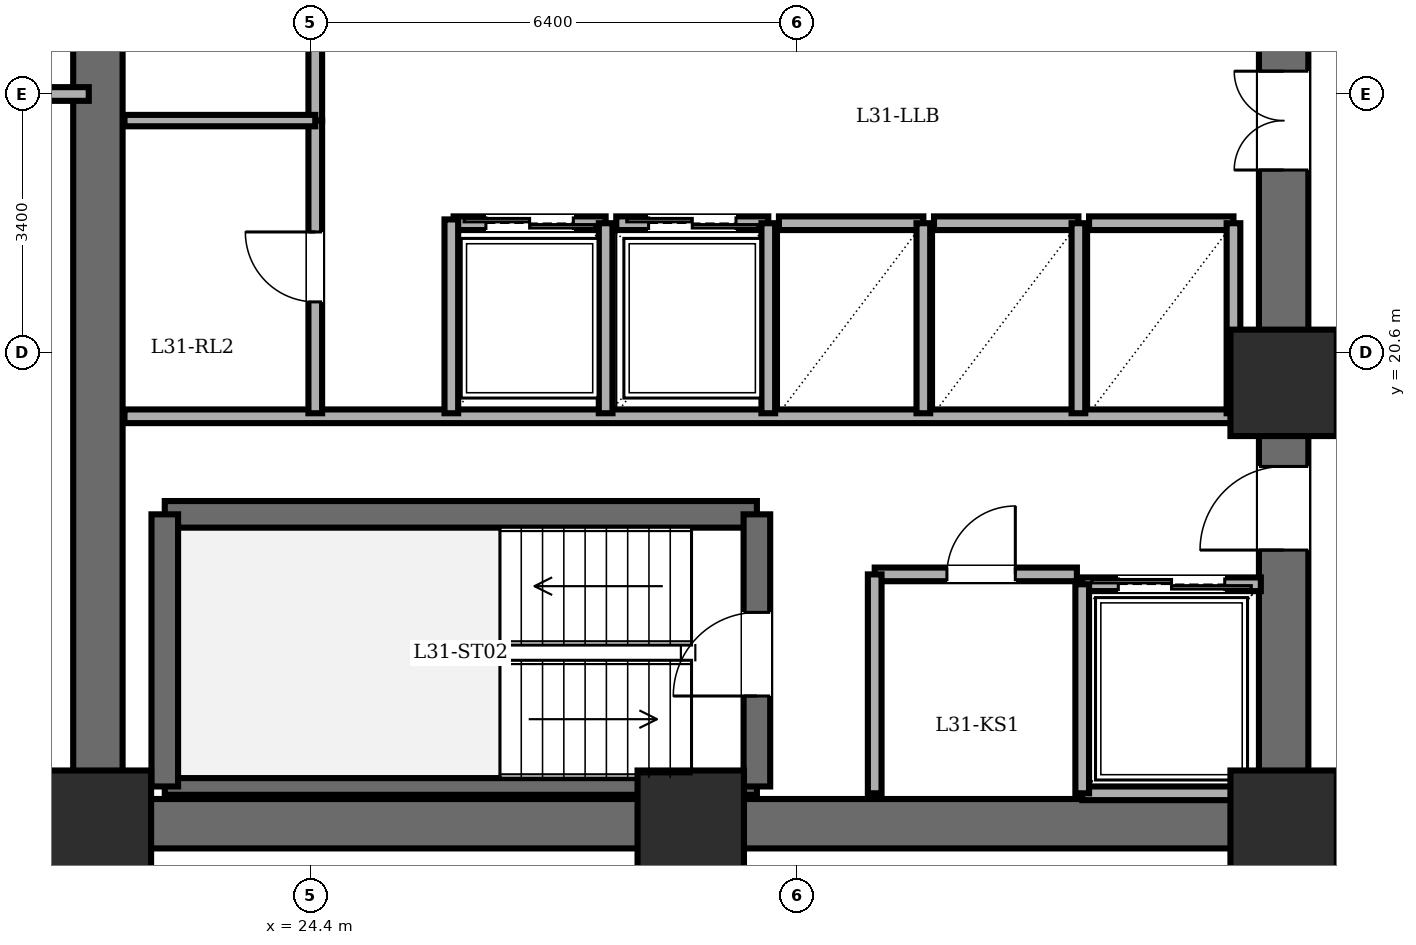
"""IFC4 building model, lengths in metres.
Left out: names, types, materials, properties, quantities, classifications, styles, units other than length and angle.
Written with IfcOpenShell. Run it as: python <this file> out.ifc"""

import sys

from ifc_helpers import new_model, si_unit, direction, frame, frame_2d, origin, origin_2d, place, context, subcontext, project, spatial, rectangle, extrude, element, fill, save


model = new_model("IFC4")
c1 = context("Model", 3, precision=1e-05, world=origin(), true_north=direction((0.0, 1.0)))
c2 = subcontext(c1, "Body", "Model", "MODEL_VIEW")
j1 = project(units=[si_unit("LENGTHUNIT", "METRE"), si_unit("PLANEANGLEUNIT", "RADIAN")], contexts=[c1])
p1 = place(None, origin())
s1 = spatial("IfcSite", under=j1, at=p1, CompositionType="ELEMENT")
p2 = place(p1, origin())
s2 = spatial("IfcBuilding", under=s1, at=p2, CompositionType="ELEMENT")
p3 = place(p2, frame((0.0, 0.0, 118.7)))
s3 = spatial("IfcBuildingStorey", under=s2, at=p3, CompositionType="ELEMENT", Elevation=118.7)
for number, where, z_axis, x_axis in (
    (1, (21.6, 14.4, 0.0), (0.0, 0.0, 1.0), (1.0, 0.0, 0.0)),
    (2, (29.4, 14.4, 0.0), (0.0, 0.0, 1.0), (1.0, 0.0, 0.0)),
    (3, (37.2, 14.4, 0.0), (0.0, 0.0, 1.0), (1.0, 0.0, 0.0)),
    (4, (37.2, 20.2, 0.0), (0.0, 0.0, 1.0), (1.0, 0.0, 0.0)),
):
    element("IfcColumn", number, at=place(p3, frame(where, z_axis=z_axis, x_axis=x_axis)), inside=s3, PredefinedType="COLUMN", context=c2, shape_type="SweptSolid", body=[
        extrude(rectangle(XDim=1.4, YDim=1.4, at=origin_2d()), origin(), (0.0, 0.0, 1.0), 3.6),
    ])
p4 = place(p3, frame((21.6, 14.4, 0.0), z_axis=(0.0, 0.0, 1.0), x_axis=(0.0, 1.0, 0.0)))
e5 = element("IfcWall", 5, at=p4, inside=s3, PredefinedType="SHEAR", context=c2, shape_type="SweptSolid", body=[
    extrude(rectangle(XDim=19.2, YDim=0.65, at=frame_2d((9.6, 0.0))), origin(), (0.0, 0.0, 1.0), 3.4),
])
p5 = place(p3, frame((37.2, 14.4, 0.0), z_axis=(0.0, 0.0, 1.0), x_axis=(-1.0, 0.0, 0.0)))
e6 = element("IfcWall", 6, at=p5, inside=s3, PredefinedType="SHEAR", context=c2, shape_type="SweptSolid", body=[
    extrude(rectangle(XDim=15.6, YDim=0.65, at=frame_2d((7.8, 0.0))), origin(), (0.0, 0.0, 1.0), 3.4),
])
p6 = place(p3, frame((37.2, 14.4, 0.0), z_axis=(0.0, 0.0, 1.0), x_axis=(0.0, 1.0, 0.0)))
e7 = element("IfcWall", 7, at=p6, inside=s3, PredefinedType="SHEAR", context=c2, shape_type="SweptSolid", body=[
    extrude(rectangle(XDim=19.2, YDim=0.65, at=frame_2d((9.6, 0.0))), origin(), (0.0, 0.0, 1.0), 3.4),
])
p7 = place(p6, frame((15.8, 0.0, 0.0)))
e8 = element("IfcOpeningElement", 8, at=p7, cuts=e7, PredefinedType="OPENING", context=c2, shape_type="SweptSolid", body=[
    extrude(rectangle(XDim=1.15, YDim=2.15, at=frame_2d((0.575, 1.075))), frame((0.0, 0.335, 0.0), z_axis=(0.0, -1.0, 0.0), x_axis=(1.0, 0.0, 0.0)), (0.0, 0.0, 1.0), 0.67),
])
p8 = place(p6, frame((3.6, 0.0, 0.0)))
e9 = element("IfcOpeningElement", 9, at=p8, cuts=e7, PredefinedType="OPENING", context=c2, shape_type="SweptSolid", body=[
    extrude(rectangle(XDim=1.1, YDim=2.15, at=frame_2d((0.55, 1.075))), frame((0.0, 0.335, 0.0), z_axis=(0.0, -1.0, 0.0), x_axis=(1.0, 0.0, 0.0)), (0.0, 0.0, 1.0), 0.67),
])
p9 = place(p6, frame((8.6, 0.0, 0.0)))
e10 = element("IfcOpeningElement", 10, at=p9, cuts=e7, PredefinedType="OPENING", context=c2, shape_type="SweptSolid", body=[
    extrude(rectangle(XDim=1.3, YDim=2.2, at=frame_2d((0.65, 1.1))), frame((0.0, 0.335, 0.0), z_axis=(0.0, -1.0, 0.0), x_axis=(1.0, 0.0, 0.0)), (0.0, 0.0, 1.0), 0.67),
])
p10 = place(p3, frame((22.48, 18.47, 0.0), z_axis=(0.0, 0.0, 1.0), x_axis=(1.0, 0.0, 0.0)))
e11 = element("IfcWall", 11, at=p10, inside=s3, PredefinedType="SOLIDWALL", context=c2, shape_type="SweptSolid", body=[
    extrude(rectangle(XDim=7.79, YDim=0.35, at=frame_2d((3.895, 0.0))), origin(), (0.0, 0.0, 1.0), 3.4),
])
p11 = place(p3, frame((22.48, 14.89, 0.0), z_axis=(0.0, 0.0, 1.0), x_axis=(1.0, 0.0, 0.0)))
e12 = element("IfcWall", 12, at=p11, inside=s3, PredefinedType="PARTITIONING", context=c2, shape_type="SweptSolid", body=[
    extrude(rectangle(XDim=7.79, YDim=0.22, at=frame_2d((3.895, 0.0))), origin(), (0.0, 0.0, 1.0), 3.4),
])
p12 = place(p3, frame((22.48, 14.89, 0.0), z_axis=(0.0, 0.0, 1.0), x_axis=(0.0, 1.0, 0.0)))
e13 = element("IfcWall", 13, at=p12, inside=s3, PredefinedType="SOLIDWALL", context=c2, shape_type="SweptSolid", body=[
    extrude(rectangle(XDim=3.58, YDim=0.35, at=frame_2d((1.79, 0.0))), origin(), (0.0, 0.0, 1.0), 3.4),
])
p13 = place(p3, frame((30.27, 14.89, 0.0), z_axis=(0.0, 0.0, 1.0), x_axis=(0.0, 1.0, 0.0)))
e14 = element("IfcWall", 14, at=p13, inside=s3, PredefinedType="SOLIDWALL", context=c2, shape_type="SweptSolid", body=[
    extrude(rectangle(XDim=3.58, YDim=0.35, at=frame_2d((1.79, 0.0))), origin(), (0.0, 0.0, 1.0), 3.4),
])
p14 = place(p13, frame((1.19, 0.0, 0.0)))
e15 = element("IfcOpeningElement", 15, at=p14, cuts=e14, PredefinedType="OPENING", context=c2, shape_type="SweptSolid", body=[
    extrude(rectangle(XDim=1.1, YDim=2.15, at=frame_2d((0.55, 1.075))), frame((0.0, 0.185, 0.0), z_axis=(0.0, -1.0, 0.0), x_axis=(1.0, 0.0, 0.0)), (0.0, 0.0, 1.0), 0.37),
])
p15 = place(p3, frame((21.95, 19.76, 0.0), z_axis=(0.0, 0.0, 1.0), x_axis=(1.0, 0.0, 0.0)))
e16 = element("IfcWall", 16, at=p15, inside=s3, PredefinedType="PARTITIONING", context=c2, shape_type="SweptSolid", body=[
    extrude(rectangle(XDim=14.87, YDim=0.18, at=frame_2d((7.435, 0.0))), origin(), (0.0, 0.0, 1.0), 3.4),
])
p16 = place(p3, frame((31.82, 17.68, 0.0), z_axis=(0.0, 0.0, 1.0), x_axis=(1.0, 0.0, 0.0)))
e17 = element("IfcWall", 17, at=p16, inside=s3, PredefinedType="PARTITIONING", context=c2, shape_type="SweptSolid", body=[
    extrude(rectangle(XDim=2.66, YDim=0.18, at=frame_2d((1.33, 0.0))), origin(), (0.0, 0.0, 1.0), 3.4),
])
p17 = place(p16, frame((0.95, 0.0, 0.0)))
e18 = element("IfcOpeningElement", 18, at=p17, cuts=e17, PredefinedType="OPENING", context=c2, shape_type="SweptSolid", body=[
    extrude(rectangle(XDim=0.9, YDim=2.05, at=frame_2d((0.45, 1.025))), frame((0.0, 0.1, 0.0), z_axis=(0.0, -1.0, 0.0), x_axis=(1.0, 0.0, 0.0)), (0.0, 0.0, 1.0), 0.2),
])
p18 = place(p3, frame((31.82, 14.8, 0.0), z_axis=(0.0, 0.0, 1.0), x_axis=(0.0, 1.0, 0.0)))
e19 = element("IfcWall", 19, at=p18, inside=s3, PredefinedType="PARTITIONING", context=c2, shape_type="SweptSolid", body=[
    extrude(rectangle(XDim=2.88, YDim=0.18, at=frame_2d((1.44, 0.0))), origin(), (0.0, 0.0, 1.0), 3.4),
])
p19 = place(p3, frame((34.55, 17.55, 0.0), z_axis=(0.0, 0.0, 1.0), x_axis=(1.0, 0.0, 0.0)))
e20 = element("IfcWall", 20, at=p19, inside=s3, PredefinedType="PARTITIONING", context=c2, shape_type="SweptSolid", body=[
    extrude(rectangle(XDim=2.35, YDim=0.18, at=frame_2d((1.175, 0.0))), origin(), (0.0, 0.0, 1.0), 3.4),
])
p20 = place(p19, frame((0.475, 0.0, 0.0)))
e21 = element("IfcOpeningElement", 21, at=p20, cuts=e20, PredefinedType="OPENING", context=c2, shape_type="SweptSolid", body=[
    extrude(rectangle(XDim=1.4, YDim=2.3, at=frame_2d((0.7, 1.15))), frame((0.0, 0.1, 0.0), z_axis=(0.0, -1.0, 0.0), x_axis=(1.0, 0.0, 0.0)), (0.0, 0.0, 1.0), 0.2),
])
p21 = place(p3, frame((36.9, 14.8, 0.0), z_axis=(0.0, 0.0, 1.0), x_axis=(-1.0, 0.0, 0.0)))
e22 = element("IfcWall", 22, at=p21, inside=s3, PredefinedType="PARTITIONING", context=c2, shape_type="SweptSolid", body=[
    extrude(rectangle(XDim=2.35, YDim=0.18, at=frame_2d((1.175, 0.0))), origin(), (0.0, 0.0, 1.0), 3.4),
])
p22 = place(p3, frame((34.55, 17.55, 0.0), z_axis=(0.0, 0.0, 1.0), x_axis=(0.0, -1.0, 0.0)))
e23 = element("IfcWall", 23, at=p22, inside=s3, PredefinedType="PARTITIONING", context=c2, shape_type="SweptSolid", body=[
    extrude(rectangle(XDim=2.75, YDim=0.18, at=frame_2d((1.375, 0.0))), origin(), (0.0, 0.0, 1.0), 3.4),
])
p23 = place(p3, frame((26.28, 22.3, 0.0), z_axis=(0.0, 0.0, 1.0), x_axis=(1.0, 0.0, 0.0)))
e24 = element("IfcWall", 24, at=p23, inside=s3, PredefinedType="PARTITIONING", context=c2, shape_type="SweptSolid", body=[
    extrude(rectangle(XDim=2.0, YDim=0.18, at=frame_2d((1.0, 0.0))), origin(), (0.0, 0.0, 1.0), 3.4),
])
p24 = place(p23, frame((0.425, 0.0, 0.0)))
e25 = element("IfcOpeningElement", 25, at=p24, cuts=e24, PredefinedType="OPENING", context=c2, shape_type="SweptSolid", body=[
    extrude(rectangle(XDim=1.15, YDim=2.2, at=frame_2d((0.575, 1.1))), frame((0.0, 0.1, 0.0), z_axis=(0.0, -1.0, 0.0), x_axis=(1.0, 0.0, 0.0)), (0.0, 0.0, 1.0), 0.2),
])
p25 = place(p3, frame((28.28, 19.8, 0.0), z_axis=(0.0, 0.0, 1.0), x_axis=(0.0, 1.0, 0.0)))
e26 = element("IfcWall", 26, at=p25, inside=s3, PredefinedType="PARTITIONING", context=c2, shape_type="SweptSolid", body=[
    extrude(rectangle(XDim=2.5, YDim=0.18, at=frame_2d((1.25, 0.0))), origin(), (0.0, 0.0, 1.0), 3.4),
])
p26 = place(p3, frame((28.42, 22.3, 0.0), z_axis=(0.0, 0.0, 1.0), x_axis=(1.0, 0.0, 0.0)))
e27 = element("IfcWall", 27, at=p26, inside=s3, PredefinedType="PARTITIONING", context=c2, shape_type="SweptSolid", body=[
    extrude(rectangle(XDim=2.0, YDim=0.18, at=frame_2d((1.0, 0.0))), origin(), (0.0, 0.0, 1.0), 3.4),
])
p27 = place(p26, frame((0.425, 0.0, 0.0)))
e28 = element("IfcOpeningElement", 28, at=p27, cuts=e27, PredefinedType="OPENING", context=c2, shape_type="SweptSolid", body=[
    extrude(rectangle(XDim=1.15, YDim=2.2, at=frame_2d((0.575, 1.1))), frame((0.0, 0.1, 0.0), z_axis=(0.0, -1.0, 0.0), x_axis=(1.0, 0.0, 0.0)), (0.0, 0.0, 1.0), 0.2),
])
p28 = place(p3, frame((30.42, 19.8, 0.0), z_axis=(0.0, 0.0, 1.0), x_axis=(0.0, 1.0, 0.0)))
e29 = element("IfcWall", 29, at=p28, inside=s3, PredefinedType="PARTITIONING", context=c2, shape_type="SweptSolid", body=[
    extrude(rectangle(XDim=2.5, YDim=0.18, at=frame_2d((1.25, 0.0))), origin(), (0.0, 0.0, 1.0), 3.4),
])
p29 = place(p3, frame((30.56, 22.3, 0.0), z_axis=(0.0, 0.0, 1.0), x_axis=(1.0, 0.0, 0.0)))
e30 = element("IfcWall", 30, at=p29, inside=s3, PredefinedType="PARTITIONING", context=c2, shape_type="SweptSolid", body=[
    extrude(rectangle(XDim=1.9, YDim=0.18, at=frame_2d((0.95, 0.0))), origin(), (0.0, 0.0, 1.0), 3.4),
])
p30 = place(p3, frame((32.46, 19.8, 0.0), z_axis=(0.0, 0.0, 1.0), x_axis=(0.0, 1.0, 0.0)))
e31 = element("IfcWall", 31, at=p30, inside=s3, PredefinedType="PARTITIONING", context=c2, shape_type="SweptSolid", body=[
    extrude(rectangle(XDim=2.5, YDim=0.18, at=frame_2d((1.25, 0.0))), origin(), (0.0, 0.0, 1.0), 3.4),
])
p31 = place(p3, frame((32.6, 22.3, 0.0), z_axis=(0.0, 0.0, 1.0), x_axis=(1.0, 0.0, 0.0)))
e32 = element("IfcWall", 32, at=p31, inside=s3, PredefinedType="PARTITIONING", context=c2, shape_type="SweptSolid", body=[
    extrude(rectangle(XDim=1.9, YDim=0.18, at=frame_2d((0.95, 0.0))), origin(), (0.0, 0.0, 1.0), 3.4),
])
p32 = place(p3, frame((34.5, 19.8, 0.0), z_axis=(0.0, 0.0, 1.0), x_axis=(0.0, 1.0, 0.0)))
e33 = element("IfcWall", 33, at=p32, inside=s3, PredefinedType="PARTITIONING", context=c2, shape_type="SweptSolid", body=[
    extrude(rectangle(XDim=2.5, YDim=0.18, at=frame_2d((1.25, 0.0))), origin(), (0.0, 0.0, 1.0), 3.4),
])
p33 = place(p3, frame((34.64, 22.3, 0.0), z_axis=(0.0, 0.0, 1.0), x_axis=(1.0, 0.0, 0.0)))
e34 = element("IfcWall", 34, at=p33, inside=s3, PredefinedType="PARTITIONING", context=c2, shape_type="SweptSolid", body=[
    extrude(rectangle(XDim=1.9, YDim=0.18, at=frame_2d((0.95, 0.0))), origin(), (0.0, 0.0, 1.0), 3.4),
])
p34 = place(p3, frame((36.54, 19.8, 0.0), z_axis=(0.0, 0.0, 1.0), x_axis=(0.0, 1.0, 0.0)))
e35 = element("IfcWall", 35, at=p34, inside=s3, PredefinedType="PARTITIONING", context=c2, shape_type="SweptSolid", body=[
    extrude(rectangle(XDim=2.5, YDim=0.18, at=frame_2d((1.25, 0.0))), origin(), (0.0, 0.0, 1.0), 3.4),
])
p35 = place(p3, frame((24.46, 23.65, 0.0), z_axis=(0.0, 0.0, 1.0), x_axis=(0.0, 1.0, 0.0)))
e36 = element("IfcWall", 36, at=p35, inside=s3, PredefinedType="PARTITIONING", context=c2, shape_type="SweptSolid", body=[
    extrude(rectangle(XDim=3.85, YDim=0.18, at=frame_2d((1.925, 0.0))), origin(), (0.0, 0.0, 1.0), 3.4),
])
p36 = place(p35, frame((1.465, 0.0, 0.0)))
e37 = element("IfcOpeningElement", 37, at=p36, cuts=e36, PredefinedType="OPENING", context=c2, shape_type="SweptSolid", body=[
    extrude(rectangle(XDim=0.92, YDim=2.1, at=frame_2d((0.46, 1.05))), frame((0.0, 0.1, 0.0), z_axis=(0.0, -1.0, 0.0), x_axis=(1.0, 0.0, 0.0)), (0.0, 0.0, 1.0), 0.2),
])
p37 = place(p3, frame((24.46, 19.8, 0.0), z_axis=(0.0, 0.0, 1.0), x_axis=(0.0, 1.0, 0.0)))
e38 = element("IfcWall", 38, at=p37, inside=s3, PredefinedType="PARTITIONING", context=c2, shape_type="SweptSolid", body=[
    extrude(rectangle(XDim=3.85, YDim=0.18, at=frame_2d((1.925, 0.0))), origin(), (0.0, 0.0, 1.0), 3.4),
])
p38 = place(p37, frame((1.465, 0.0, 0.0)))
e39 = element("IfcOpeningElement", 39, at=p38, cuts=e38, PredefinedType="OPENING", context=c2, shape_type="SweptSolid", body=[
    extrude(rectangle(XDim=0.92, YDim=2.1, at=frame_2d((0.46, 1.05))), frame((0.0, 0.1, 0.0), z_axis=(0.0, -1.0, 0.0), x_axis=(1.0, 0.0, 0.0)), (0.0, 0.0, 1.0), 0.2),
])
p39 = place(p3, frame((21.95, 23.65, 0.0), z_axis=(0.0, 0.0, 1.0), x_axis=(1.0, 0.0, 0.0)))
e40 = element("IfcWall", 40, at=p39, inside=s3, PredefinedType="PARTITIONING", context=c2, shape_type="SweptSolid", body=[
    extrude(rectangle(XDim=2.51, YDim=0.15, at=frame_2d((1.255, 0.0))), origin(), (0.0, 0.0, 1.0), 3.4),
])
p40 = place(p3, frame((26.25, 19.8, 0.0), z_axis=(0.0, 0.0, 1.0), x_axis=(0.0, 1.0, 0.0)))
e41 = element("IfcWall", 41, at=p40, inside=s3, PredefinedType="PARTITIONING", context=c2, shape_type="SweptSolid", body=[
    extrude(rectangle(XDim=2.55, YDim=0.18, at=frame_2d((1.275, 0.0))), origin(), (0.0, 0.0, 1.0), 3.4),
])
p41 = place(p3, frame((8.8, 14.18, 0.0), z_axis=(0.0, 0.0, 1.0), x_axis=(1.0, 0.0, 0.0)))
e42 = element("IfcWall", 42, at=p41, inside=s3, PredefinedType="PARTITIONING", context=c2, shape_type="SweptSolid", body=[
    extrude(rectangle(XDim=12.68, YDim=0.18, at=frame_2d((6.34, 0.0))), origin(), (0.0, 0.0, 1.0), 3.4),
])
p42 = place(p41, frame((6.18, 0.0, 0.0)))
e43 = element("IfcOpeningElement", 43, at=p42, cuts=e42, PredefinedType="OPENING", context=c2, shape_type="SweptSolid", body=[
    extrude(rectangle(XDim=1.0, YDim=2.15, at=frame_2d((0.5, 1.075))), frame((0.0, 0.1, 0.0), z_axis=(0.0, -1.0, 0.0), x_axis=(1.0, 0.0, 0.0)), (0.0, 0.0, 1.0), 0.2),
])
p43 = place(p3, frame((8.8, 24.0, 0.0), z_axis=(0.0, 0.0, 1.0), x_axis=(1.0, 0.0, 0.0)))
e44 = element("IfcWall", 44, at=p43, inside=s3, PredefinedType="PARTITIONING", context=c2, shape_type="SweptSolid", body=[
    extrude(rectangle(XDim=12.68, YDim=0.18, at=frame_2d((6.34, 0.0))), origin(), (0.0, 0.0, 1.0), 3.4),
])
p44 = place(p14, origin())
e45 = element("IfcDoor", 45, at=p44, inside=s3, OperationType="SINGLE_SWING_LEFT", PredefinedType="DOOR", context=c2, shape_type="SweptSolid", body=[
    extrude(rectangle(XDim=1.1, YDim=2.15, at=frame_2d((0.55, 1.075))), frame((0.0, 0.025, 0.0), z_axis=(0.0, -1.0, 0.0), x_axis=(1.0, 0.0, 0.0)), (0.0, 0.0, 1.0), 0.05),
])
fill(e15, e45)
p45 = place(p8, origin())
e46 = element("IfcDoor", 46, at=p45, inside=s3, OperationType="SINGLE_SWING_LEFT", PredefinedType="DOOR", context=c2, shape_type="SweptSolid", body=[
    extrude(rectangle(XDim=1.1, YDim=2.15, at=frame_2d((0.55, 1.075))), frame((0.0, 0.025, 0.0), z_axis=(0.0, -1.0, 0.0), x_axis=(1.0, 0.0, 0.0)), (0.0, 0.0, 1.0), 0.05),
])
fill(e9, e46)
p46 = place(p17, origin())
e47 = element("IfcDoor", 47, at=p46, inside=s3, OperationType="SINGLE_SWING_RIGHT", PredefinedType="DOOR", context=c2, shape_type="SweptSolid", body=[
    extrude(rectangle(XDim=0.9, YDim=2.05, at=frame_2d((0.45, 1.025))), frame((0.0, 0.025, 0.0), z_axis=(0.0, -1.0, 0.0), x_axis=(1.0, 0.0, 0.0)), (0.0, 0.0, 1.0), 0.05),
])
fill(e18, e47)
p47 = place(p20, origin())
e48 = element("IfcDoor", 48, at=p47, inside=s3, OperationType="DOUBLE_DOOR_SLIDING", PredefinedType="DOOR", context=c2, shape_type="SweptSolid", body=[
    extrude(rectangle(XDim=1.4, YDim=2.3, at=frame_2d((0.7, 1.15))), frame((0.0, 0.025, 0.0), z_axis=(0.0, -1.0, 0.0), x_axis=(1.0, 0.0, 0.0)), (0.0, 0.0, 1.0), 0.05),
])
fill(e21, e48)
p48 = place(p24, origin())
e49 = element("IfcDoor", 49, at=p48, inside=s3, OperationType="DOUBLE_DOOR_SLIDING", PredefinedType="DOOR", context=c2, shape_type="SweptSolid", body=[
    extrude(rectangle(XDim=1.15, YDim=2.2, at=frame_2d((0.575, 1.1))), frame((0.0, 0.025, 0.0), z_axis=(0.0, -1.0, 0.0), x_axis=(1.0, 0.0, 0.0)), (0.0, 0.0, 1.0), 0.05),
])
fill(e25, e49)
p49 = place(p27, origin())
e50 = element("IfcDoor", 50, at=p49, inside=s3, OperationType="DOUBLE_DOOR_SLIDING", PredefinedType="DOOR", context=c2, shape_type="SweptSolid", body=[
    extrude(rectangle(XDim=1.15, YDim=2.2, at=frame_2d((0.575, 1.1))), frame((0.0, 0.025, 0.0), z_axis=(0.0, -1.0, 0.0), x_axis=(1.0, 0.0, 0.0)), (0.0, 0.0, 1.0), 0.05),
])
fill(e28, e50)
p50 = place(p38, origin())
e51 = element("IfcDoor", 51, at=p50, inside=s3, OperationType="SINGLE_SWING_RIGHT", PredefinedType="DOOR", context=c2, shape_type="SweptSolid", body=[
    extrude(rectangle(XDim=0.92, YDim=2.1, at=frame_2d((0.46, 1.05))), frame((0.0, 0.025, 0.0), z_axis=(0.0, -1.0, 0.0), x_axis=(1.0, 0.0, 0.0)), (0.0, 0.0, 1.0), 0.05),
])
fill(e39, e51)
p51 = place(p9, origin())
e52 = element("IfcDoor", 52, at=p51, inside=s3, OperationType="DOUBLE_DOOR_SINGLE_SWING", PredefinedType="DOOR", context=c2, shape_type="SweptSolid", body=[
    extrude(rectangle(XDim=1.3, YDim=2.2, at=frame_2d((0.65, 1.1))), frame((0.0, 0.025, 0.0), z_axis=(0.0, -1.0, 0.0), x_axis=(1.0, 0.0, 0.0)), (0.0, 0.0, 1.0), 0.05),
])
fill(e10, e52)
save(model, sys.argv[1])
